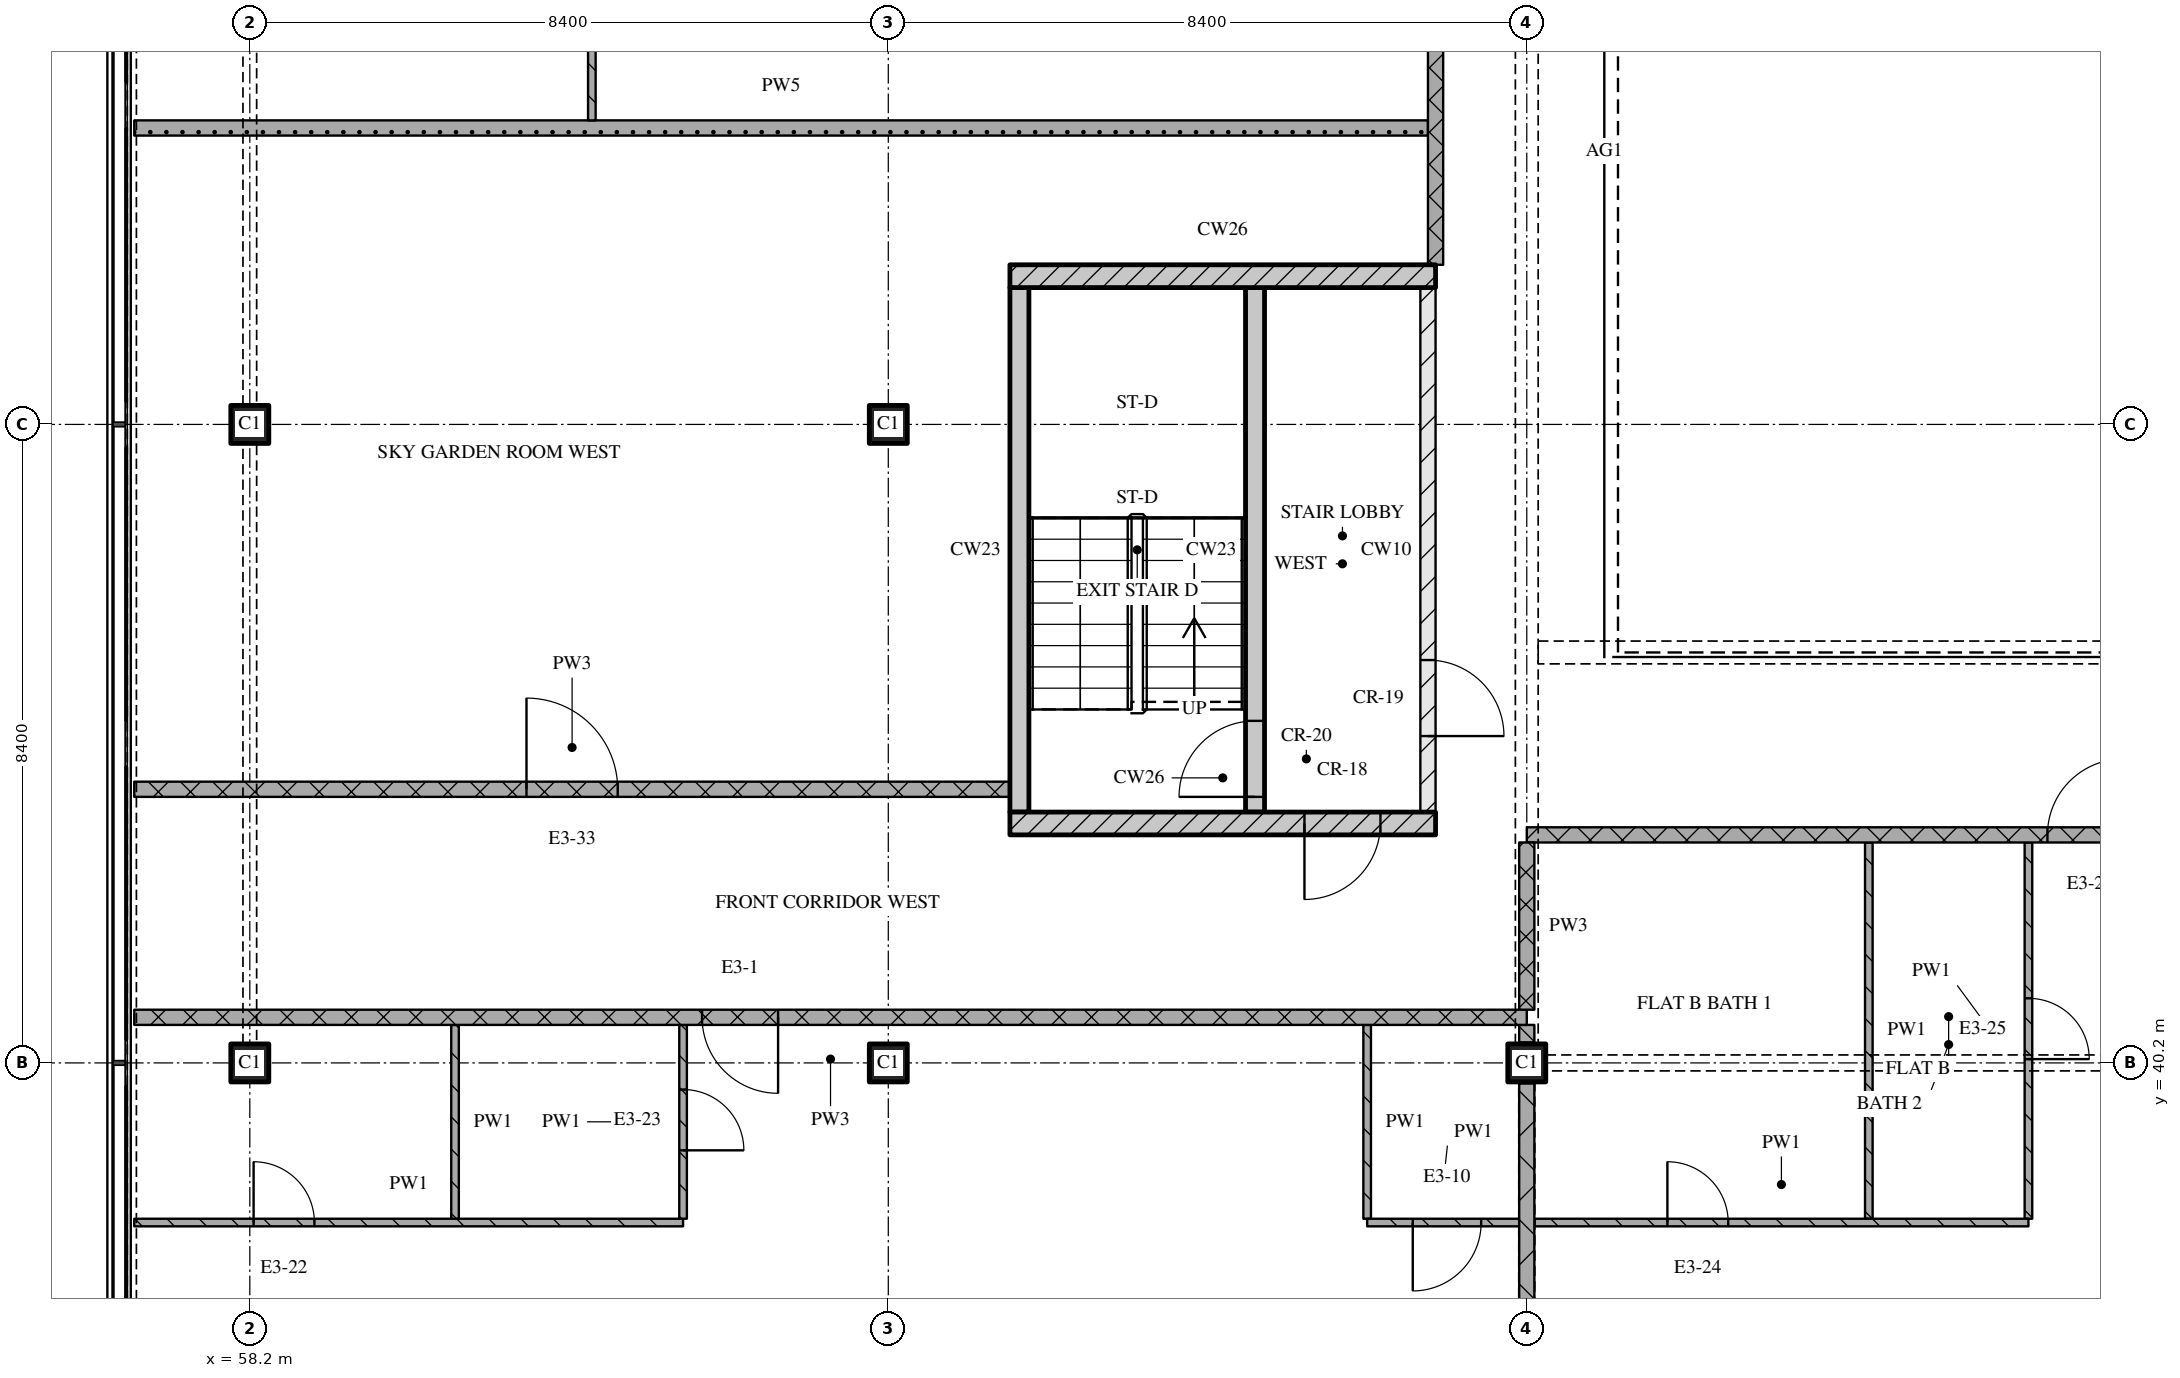
"""IFC4 building model, lengths in metres.
Left out: names, types, materials, properties, quantities, classifications, styles, units other than length and angle.
Written with IfcOpenShell. Run it as: python <this file> out.ifc"""

import sys

from ifc_helpers import new_model, si_unit, direction, frame, frame_2d, origin, origin_2d, place, context, subcontext, project, spatial, rectangle, extrude, element, fill, save


model = new_model("IFC4")
c1 = context("Model", 3, precision=1e-05, world=origin(), true_north=direction((0.0, 1.0)))
c2 = subcontext(c1, "Body", "Model", "MODEL_VIEW")
j1 = project(units=[si_unit("LENGTHUNIT", "METRE"), si_unit("PLANEANGLEUNIT", "RADIAN")], contexts=[c1])
p1 = place(None, origin())
s1 = spatial("IfcSite", under=j1, at=p1, CompositionType="ELEMENT")
p2 = place(p1, origin())
s2 = spatial("IfcBuilding", under=s1, at=p2, CompositionType="ELEMENT")
p3 = place(p2, frame((0.0, 0.0, 277.95)))
s3 = spatial("IfcBuildingStorey", under=s2, at=p3, CompositionType="ELEMENT", Elevation=277.95)
for number, where, z_axis, x_axis in (
    (1, (58.2, 40.2, 0.0), (0.0, 0.0, 1.0), (1.0, 0.0, 0.0)),
    (2, (58.2, 48.6, 0.0), (0.0, 0.0, 1.0), (1.0, 0.0, 0.0)),
    (3, (66.6, 40.2, 0.0), (0.0, 0.0, 1.0), (1.0, 0.0, 0.0)),
    (4, (66.6, 48.6, 0.0), (0.0, 0.0, 1.0), (1.0, 0.0, 0.0)),
    (5, (75.0, 40.2, 0.0), (0.0, 0.0, 1.0), (1.0, 0.0, 0.0)),
):
    element("IfcColumn", number, at=place(p3, frame(where, z_axis=z_axis, x_axis=x_axis)), inside=s3, PredefinedType="COLUMN", context=c2, shape_type="SweptSolid", body=[
        extrude(rectangle(XDim=0.5, YDim=0.5, at=origin_2d()), origin(), (0.0, 0.0, 1.0), 3.6),
    ])
p4 = place(p3, frame((68.2, 43.35, 0.0), z_axis=(0.0, 0.0, 1.0), x_axis=(1.0, 0.0, 0.0)))
e6 = element("IfcWall", 6, at=p4, inside=s3, PredefinedType="SOLIDWALL", context=c2, shape_type="SweptSolid", body=[
    extrude(rectangle(XDim=5.6, YDim=0.3, at=frame_2d((2.8, 0.0))), origin(), (0.0, 0.0, 1.0), 3.32),
])
p5 = place(p4, frame((3.875, 0.0, 0.0)))
e7 = element("IfcOpeningElement", 7, at=p5, cuts=e6, PredefinedType="OPENING", context=c2, shape_type="SweptSolid", body=[
    extrude(rectangle(XDim=1.0, YDim=2.1, at=frame_2d((0.5, 1.05))), frame((0.0, 0.16, 0.0), z_axis=(0.0, -1.0, 0.0), x_axis=(1.0, 0.0, 0.0)), (0.0, 0.0, 1.0), 0.32),
])
p6 = place(p3, frame((68.325, 43.5, 0.0), z_axis=(0.0, 0.0, 1.0), x_axis=(0.0, 1.0, 0.0)))
e8 = element("IfcWall", 8, at=p6, inside=s3, PredefinedType="SOLIDWALL", context=c2, shape_type="SweptSolid", body=[
    extrude(rectangle(XDim=6.9, YDim=0.25, at=frame_2d((3.45, 0.0))), origin(), (0.0, 0.0, 1.0), 3.32),
])
p7 = place(p3, frame((71.425, 43.5, 0.0), z_axis=(0.0, 0.0, 1.0), x_axis=(0.0, 1.0, 0.0)))
e9 = element("IfcWall", 9, at=p7, inside=s3, PredefinedType="SOLIDWALL", context=c2, shape_type="SweptSolid", body=[
    extrude(rectangle(XDim=6.9, YDim=0.25, at=frame_2d((3.45, 0.0))), origin(), (0.0, 0.0, 1.0), 3.32),
])
p8 = place(p7, frame((0.2, 0.0, 0.0)))
e10 = element("IfcOpeningElement", 10, at=p8, cuts=e9, PredefinedType="OPENING", context=c2, shape_type="SweptSolid", body=[
    extrude(rectangle(XDim=1.0, YDim=2.1, at=frame_2d((0.5, 1.05))), frame((0.0, 0.135, 0.0), z_axis=(0.0, -1.0, 0.0), x_axis=(1.0, 0.0, 0.0)), (0.0, 0.0, 1.0), 0.27),
])
p9 = place(p3, frame((73.7, 43.5, 0.0), z_axis=(0.0, 0.0, 1.0), x_axis=(0.0, 1.0, 0.0)))
e11 = element("IfcWall", 11, at=p9, inside=s3, PredefinedType="PARTITIONING", context=c2, shape_type="SweptSolid", body=[
    extrude(rectangle(XDim=6.9, YDim=0.2, at=frame_2d((3.45, 0.0))), origin(), (0.0, 0.0, 1.0), 3.32),
])
p10 = place(p9, frame((1.0, 0.0, 0.0)))
e12 = element("IfcOpeningElement", 12, at=p10, cuts=e11, PredefinedType="OPENING", context=c2, shape_type="SweptSolid", body=[
    extrude(rectangle(XDim=1.0, YDim=2.1, at=frame_2d((0.5, 1.05))), frame((0.0, 0.11, 0.0), z_axis=(0.0, -1.0, 0.0), x_axis=(1.0, 0.0, 0.0)), (0.0, 0.0, 1.0), 0.22),
])
p11 = place(p3, frame((68.2, 50.55, 0.0), z_axis=(0.0, 0.0, 1.0), x_axis=(1.0, 0.0, 0.0)))
e13 = element("IfcWall", 13, at=p11, inside=s3, PredefinedType="SOLIDWALL", context=c2, shape_type="SweptSolid", body=[
    extrude(rectangle(XDim=5.6, YDim=0.3, at=frame_2d((2.8, 0.0))), origin(), (0.0, 0.0, 1.0), 3.32),
])
p12 = place(p3, frame((56.68, 38.1, 0.0), z_axis=(0.0, 0.0, 1.0), x_axis=(1.0, 0.0, 0.0)))
e14 = element("IfcWall", 14, at=p12, inside=s3, PredefinedType="PARTITIONING", context=c2, shape_type="SweptSolid", body=[
    extrude(rectangle(XDim=7.22, YDim=0.1, at=frame_2d((3.61, 0.0))), origin(), (0.0, 0.0, 1.0), 3.32),
])
p13 = place(p12, frame((1.57, 0.0, 0.0)))
e15 = element("IfcOpeningElement", 15, at=p13, cuts=e14, PredefinedType="OPENING", context=c2, shape_type="SweptSolid", body=[
    extrude(rectangle(XDim=0.8, YDim=2.1, at=frame_2d((0.4, 1.05))), frame((0.0, 0.06, 0.0), z_axis=(0.0, -1.0, 0.0), x_axis=(1.0, 0.0, 0.0)), (0.0, 0.0, 1.0), 0.12),
])
p14 = place(p3, frame((75.0, 40.8, 0.0), z_axis=(0.0, 0.0, 1.0), x_axis=(-1.0, 0.0, 0.0)))
e16 = element("IfcWall", 16, at=p14, inside=s3, PredefinedType="PARTITIONING", context=c2, shape_type="SweptSolid", body=[
    extrude(rectangle(XDim=18.32, YDim=0.2, at=frame_2d((9.16, 0.0))), origin(), (0.0, 0.0, 1.0), 3.32),
])
p15 = place(p14, frame((9.85, 0.0, 0.0)))
e17 = element("IfcOpeningElement", 17, at=p15, cuts=e16, PredefinedType="OPENING", context=c2, shape_type="SweptSolid", body=[
    extrude(rectangle(XDim=1.0, YDim=2.1, at=frame_2d((0.5, 1.05))), frame((0.0, 0.11, 0.0), z_axis=(0.0, -1.0, 0.0), x_axis=(1.0, 0.0, 0.0)), (0.0, 0.0, 1.0), 0.22),
])
p16 = place(p3, frame((100.2, 43.2, 0.0), z_axis=(0.0, 0.0, 1.0), x_axis=(-1.0, 0.0, 0.0)))
e18 = element("IfcWall", 18, at=p16, inside=s3, PredefinedType="PARTITIONING", context=c2, shape_type="SweptSolid", body=[
    extrude(rectangle(XDim=25.2, YDim=0.2, at=frame_2d((12.6, 0.0))), origin(), (0.0, 0.0, 1.0), 3.32),
])
p17 = place(p16, frame((17.35, 0.0, 0.0)))
e19 = element("IfcOpeningElement", 19, at=p17, cuts=e18, PredefinedType="OPENING", context=c2, shape_type="SweptSolid", body=[
    extrude(rectangle(XDim=1.0, YDim=2.1, at=frame_2d((0.5, 1.05))), frame((0.0, 0.11, 0.0), z_axis=(0.0, -1.0, 0.0), x_axis=(1.0, 0.0, 0.0)), (0.0, 0.0, 1.0), 0.22),
])
p18 = place(p3, frame((56.68, 43.8, 0.0), z_axis=(0.0, 0.0, 1.0), x_axis=(1.0, 0.0, 0.0)))
e20 = element("IfcWall", 20, at=p18, inside=s3, PredefinedType="PARTITIONING", context=c2, shape_type="SweptSolid", body=[
    extrude(rectangle(XDim=11.52, YDim=0.2, at=frame_2d((5.76, 0.0))), origin(), (0.0, 0.0, 1.0), 3.32),
])
p19 = place(p18, frame((5.16, 0.0, 0.0)))
e21 = element("IfcOpeningElement", 21, at=p19, cuts=e20, PredefinedType="OPENING", context=c2, shape_type="SweptSolid", body=[
    extrude(rectangle(XDim=1.2, YDim=2.1, at=frame_2d((0.6, 1.05))), frame((0.0, 0.11, 0.0), z_axis=(0.0, -1.0, 0.0), x_axis=(1.0, 0.0, 0.0)), (0.0, 0.0, 1.0), 0.22),
])
p20 = place(p3, frame((56.68, 52.5, 0.0), z_axis=(0.0, 0.0, 1.0), x_axis=(1.0, 0.0, 0.0)))
e22 = element("IfcWall", 22, at=p20, inside=s3, PredefinedType="PARTITIONING", context=c2, shape_type="SweptSolid", body=[
    extrude(rectangle(XDim=17.02, YDim=0.2, at=frame_2d((8.51, 0.0))), origin(), (0.0, 0.0, 1.0), 3.32),
])
p21 = place(p3, frame((60.9, 40.7, 0.0), z_axis=(0.0, 0.0, 1.0), x_axis=(0.0, -1.0, 0.0)))
e23 = element("IfcWall", 23, at=p21, inside=s3, PredefinedType="PARTITIONING", context=c2, shape_type="SweptSolid", body=[
    extrude(rectangle(XDim=2.55, YDim=0.1, at=frame_2d((1.275, 0.0))), origin(), (0.0, 0.0, 1.0), 3.32),
])
p22 = place(p3, frame((62.7, 52.6, 0.0), z_axis=(0.0, 0.0, 1.0), x_axis=(0.0, 1.0, 0.0)))
e24 = element("IfcWall", 24, at=p22, inside=s3, PredefinedType="PARTITIONING", context=c2, shape_type="SweptSolid", body=[
    extrude(rectangle(XDim=3.0, YDim=0.1, at=frame_2d((1.5, 0.0))), origin(), (0.0, 0.0, 1.0), 3.32),
])
p23 = place(p22, frame((1.025, 0.0, 0.0)))
e25 = element("IfcOpeningElement", 25, at=p23, cuts=e24, PredefinedType="OPENING", context=c2, shape_type="SweptSolid", body=[
    extrude(rectangle(XDim=0.9, YDim=2.1, at=frame_2d((0.45, 1.05))), frame((0.0, 0.06, 0.0), z_axis=(0.0, -1.0, 0.0), x_axis=(1.0, 0.0, 0.0)), (0.0, 0.0, 1.0), 0.12),
])
p24 = place(p3, frame((63.9, 38.15, 0.0), z_axis=(0.0, 0.0, 1.0), x_axis=(0.0, 1.0, 0.0)))
e26 = element("IfcWall", 26, at=p24, inside=s3, PredefinedType="PARTITIONING", context=c2, shape_type="SweptSolid", body=[
    extrude(rectangle(XDim=2.55, YDim=0.1, at=frame_2d((1.275, 0.0))), origin(), (0.0, 0.0, 1.0), 3.32),
])
p25 = place(p24, frame((0.9, 0.0, 0.0)))
e27 = element("IfcOpeningElement", 27, at=p25, cuts=e26, PredefinedType="OPENING", context=c2, shape_type="SweptSolid", body=[
    extrude(rectangle(XDim=0.8, YDim=2.1, at=frame_2d((0.4, 1.05))), frame((0.0, 0.06, 0.0), z_axis=(0.0, -1.0, 0.0), x_axis=(1.0, 0.0, 0.0)), (0.0, 0.0, 1.0), 0.12),
])
p26 = place(p3, frame((72.9, 40.7, 0.0), z_axis=(0.0, 0.0, 1.0), x_axis=(0.0, -1.0, 0.0)))
e28 = element("IfcWall", 28, at=p26, inside=s3, PredefinedType="PARTITIONING", context=c2, shape_type="SweptSolid", body=[
    extrude(rectangle(XDim=2.55, YDim=0.1, at=frame_2d((1.275, 0.0))), origin(), (0.0, 0.0, 1.0), 3.32),
])
p27 = place(p3, frame((73.8, 50.7, 0.0), z_axis=(0.0, 0.0, 1.0), x_axis=(0.0, 1.0, 0.0)))
e29 = element("IfcWall", 29, at=p27, inside=s3, PredefinedType="PARTITIONING", context=c2, shape_type="SweptSolid", body=[
    extrude(rectangle(XDim=8.0, YDim=0.2, at=frame_2d((4.0, 0.0))), origin(), (0.0, 0.0, 1.0), 3.32),
])
p28 = place(p27, frame((4.45, 0.0, 0.0)))
e30 = element("IfcOpeningElement", 30, at=p28, cuts=e29, PredefinedType="OPENING", context=c2, shape_type="SweptSolid", body=[
    extrude(rectangle(XDim=1.0, YDim=2.1, at=frame_2d((0.5, 1.05))), frame((0.0, 0.11, 0.0), z_axis=(0.0, -1.0, 0.0), x_axis=(1.0, 0.0, 0.0)), (0.0, 0.0, 1.0), 0.22),
])
p29 = place(p3, frame((75.0, 43.1, 0.0), z_axis=(0.0, 0.0, 1.0), x_axis=(0.0, -1.0, 0.0)))
e31 = element("IfcWall", 31, at=p29, inside=s3, PredefinedType="PARTITIONING", context=c2, shape_type="SweptSolid", body=[
    extrude(rectangle(XDim=2.2, YDim=0.2, at=frame_2d((1.1, 0.0))), origin(), (0.0, 0.0, 1.0), 2.53),
])
p30 = place(p3, frame((75.0, 39.93, 0.0), z_axis=(0.0, 0.0, 1.0), x_axis=(0.0, -1.0, 0.0)))
e32 = element("IfcWall", 32, at=p30, inside=s3, PredefinedType="PARTITIONING", context=c2, shape_type="SweptSolid", body=[
    extrude(rectangle(XDim=7.86, YDim=0.2, at=frame_2d((3.93, 0.0))), origin(), (0.0, 0.0, 1.0), 2.77),
])
p31 = place(p3, frame((75.0, 40.7, 0.0), z_axis=(0.0, 0.0, 1.0), x_axis=(0.0, -1.0, 0.0)))
e33 = element("IfcWall", 33, at=p31, inside=s3, PredefinedType="PARTITIONING", context=c2, shape_type="SweptSolid", body=[
    extrude(rectangle(XDim=0.23, YDim=0.2, at=frame_2d((0.115, 0.0))), origin(), (0.0, 0.0, 1.0), 3.32),
])
p32 = place(p3, frame((79.5, 43.1, 0.0), z_axis=(0.0, 0.0, 1.0), x_axis=(0.0, -1.0, 0.0)))
e34 = element("IfcWall", 34, at=p32, inside=s3, PredefinedType="PARTITIONING", context=c2, shape_type="SweptSolid", body=[
    extrude(rectangle(XDim=4.95, YDim=0.1, at=frame_2d((2.475, 0.0))), origin(), (0.0, 0.0, 1.0), 3.32),
])
p33 = place(p3, frame((81.6, 38.15, 0.0), z_axis=(0.0, 0.0, 1.0), x_axis=(0.0, 1.0, 0.0)))
e35 = element("IfcWall", 35, at=p33, inside=s3, PredefinedType="PARTITIONING", context=c2, shape_type="SweptSolid", body=[
    extrude(rectangle(XDim=4.95, YDim=0.1, at=frame_2d((2.475, 0.0))), origin(), (0.0, 0.0, 1.0), 3.32),
])
p34 = place(p33, frame((2.1, 0.0, 0.0)))
e36 = element("IfcOpeningElement", 36, at=p34, cuts=e35, PredefinedType="OPENING", context=c2, shape_type="SweptSolid", body=[
    extrude(rectangle(XDim=0.8, YDim=2.1, at=frame_2d((0.4, 1.05))), frame((0.0, 0.06, 0.0), z_axis=(0.0, -1.0, 0.0), x_axis=(1.0, 0.0, 0.0)), (0.0, 0.0, 1.0), 0.12),
])
p35 = place(p3, frame((72.9, 38.1, 0.0), z_axis=(0.0, 0.0, 1.0), x_axis=(1.0, 0.0, 0.0)))
e37 = element("IfcWall", 37, at=p35, inside=s3, PredefinedType="PARTITIONING", context=c2, shape_type="SweptSolid", body=[
    extrude(rectangle(XDim=2.0, YDim=0.1, at=frame_2d((1.0, 0.0))), origin(), (0.0, 0.0, 1.0), 3.32),
])
p36 = place(p35, frame((0.6, 0.0, 0.0)))
e38 = element("IfcOpeningElement", 38, at=p36, cuts=e37, PredefinedType="OPENING", context=c2, shape_type="SweptSolid", body=[
    extrude(rectangle(XDim=0.9, YDim=2.1, at=frame_2d((0.45, 1.05))), frame((0.0, 0.06, 0.0), z_axis=(0.0, -1.0, 0.0), x_axis=(1.0, 0.0, 0.0)), (0.0, 0.0, 1.0), 0.12),
])
p37 = place(p3, frame((75.1, 38.1, 0.0), z_axis=(0.0, 0.0, 1.0), x_axis=(1.0, 0.0, 0.0)))
e39 = element("IfcWall", 39, at=p37, inside=s3, PredefinedType="PARTITIONING", context=c2, shape_type="SweptSolid", body=[
    extrude(rectangle(XDim=6.5, YDim=0.1, at=frame_2d((3.25, 0.0))), origin(), (0.0, 0.0, 1.0), 3.32),
])
p38 = place(p37, frame((1.75, 0.0, 0.0)))
e40 = element("IfcOpeningElement", 40, at=p38, cuts=e39, PredefinedType="OPENING", context=c2, shape_type="SweptSolid", body=[
    extrude(rectangle(XDim=0.8, YDim=2.1, at=frame_2d((0.4, 1.05))), frame((0.0, 0.06, 0.0), z_axis=(0.0, -1.0, 0.0), x_axis=(1.0, 0.0, 0.0)), (0.0, 0.0, 1.0), 0.12),
])
p39 = place(p5, origin())
e41 = element("IfcDoor", 41, at=p39, inside=s3, OperationType="SINGLE_SWING_RIGHT", PredefinedType="DOOR", context=c2, shape_type="SweptSolid", body=[
    extrude(rectangle(XDim=1.0, YDim=2.1, at=frame_2d((0.5, 1.05))), frame((0.0, 0.025, 0.0), z_axis=(0.0, -1.0, 0.0), x_axis=(1.0, 0.0, 0.0)), (0.0, 0.0, 1.0), 0.05),
])
fill(e7, e41)
p40 = place(p8, origin())
e42 = element("IfcDoor", 42, at=p40, inside=s3, OperationType="SINGLE_SWING_LEFT", PredefinedType="DOOR", context=c2, shape_type="SweptSolid", body=[
    extrude(rectangle(XDim=1.0, YDim=2.1, at=frame_2d((0.5, 1.05))), frame((0.0, 0.025, 0.0), z_axis=(0.0, -1.0, 0.0), x_axis=(1.0, 0.0, 0.0)), (0.0, 0.0, 1.0), 0.05),
])
fill(e10, e42)
p41 = place(p10, origin())
e43 = element("IfcDoor", 43, at=p41, inside=s3, OperationType="SINGLE_SWING_RIGHT", PredefinedType="DOOR", context=c2, shape_type="SweptSolid", body=[
    extrude(rectangle(XDim=1.0, YDim=2.1, at=frame_2d((0.5, 1.05))), frame((0.0, 0.025, 0.0), z_axis=(0.0, -1.0, 0.0), x_axis=(1.0, 0.0, 0.0)), (0.0, 0.0, 1.0), 0.05),
])
fill(e12, e43)
p42 = place(p13, origin())
e44 = element("IfcDoor", 44, at=p42, inside=s3, OperationType="SINGLE_SWING_LEFT", PredefinedType="DOOR", context=c2, shape_type="SweptSolid", body=[
    extrude(rectangle(XDim=0.8, YDim=2.1, at=frame_2d((0.4, 1.05))), frame((0.0, 0.025, 0.0), z_axis=(0.0, -1.0, 0.0), x_axis=(1.0, 0.0, 0.0)), (0.0, 0.0, 1.0), 0.05),
])
fill(e15, e44)
p43 = place(p15, origin())
e45 = element("IfcDoor", 45, at=p43, inside=s3, OperationType="SINGLE_SWING_LEFT", PredefinedType="DOOR", context=c2, shape_type="SweptSolid", body=[
    extrude(rectangle(XDim=1.0, YDim=2.1, at=frame_2d((0.5, 1.05))), frame((0.0, 0.025, 0.0), z_axis=(0.0, -1.0, 0.0), x_axis=(1.0, 0.0, 0.0)), (0.0, 0.0, 1.0), 0.05),
])
fill(e17, e45)
p44 = place(p17, origin())
e46 = element("IfcDoor", 46, at=p44, inside=s3, OperationType="SINGLE_SWING_RIGHT", PredefinedType="DOOR", context=c2, shape_type="SweptSolid", body=[
    extrude(rectangle(XDim=1.0, YDim=2.1, at=frame_2d((0.5, 1.05))), frame((0.0, 0.025, 0.0), z_axis=(0.0, -1.0, 0.0), x_axis=(1.0, 0.0, 0.0)), (0.0, 0.0, 1.0), 0.05),
])
fill(e19, e46)
p45 = place(p19, origin())
e47 = element("IfcDoor", 47, at=p45, inside=s3, OperationType="SINGLE_SWING_LEFT", PredefinedType="DOOR", context=c2, shape_type="SweptSolid", body=[
    extrude(rectangle(XDim=1.2, YDim=2.1, at=frame_2d((0.6, 1.05))), frame((0.0, 0.025, 0.0), z_axis=(0.0, -1.0, 0.0), x_axis=(1.0, 0.0, 0.0)), (0.0, 0.0, 1.0), 0.05),
])
fill(e21, e47)
p46 = place(p25, origin())
e48 = element("IfcDoor", 48, at=p46, inside=s3, OperationType="SINGLE_SWING_RIGHT", PredefinedType="DOOR", context=c2, shape_type="SweptSolid", body=[
    extrude(rectangle(XDim=0.8, YDim=2.1, at=frame_2d((0.4, 1.05))), frame((0.0, 0.025, 0.0), z_axis=(0.0, -1.0, 0.0), x_axis=(1.0, 0.0, 0.0)), (0.0, 0.0, 1.0), 0.05),
])
fill(e27, e48)
p47 = place(p34, origin())
e49 = element("IfcDoor", 49, at=p47, inside=s3, OperationType="SINGLE_SWING_RIGHT", PredefinedType="DOOR", context=c2, shape_type="SweptSolid", body=[
    extrude(rectangle(XDim=0.8, YDim=2.1, at=frame_2d((0.4, 1.05))), frame((0.0, 0.025, 0.0), z_axis=(0.0, -1.0, 0.0), x_axis=(1.0, 0.0, 0.0)), (0.0, 0.0, 1.0), 0.05),
])
fill(e36, e49)
p48 = place(p36, origin())
e50 = element("IfcDoor", 50, at=p48, inside=s3, OperationType="SINGLE_SWING_RIGHT", PredefinedType="DOOR", context=c2, shape_type="SweptSolid", body=[
    extrude(rectangle(XDim=0.9, YDim=2.1, at=frame_2d((0.45, 1.05))), frame((0.0, 0.025, 0.0), z_axis=(0.0, -1.0, 0.0), x_axis=(1.0, 0.0, 0.0)), (0.0, 0.0, 1.0), 0.05),
])
fill(e38, e50)
p49 = place(p38, origin())
e51 = element("IfcDoor", 51, at=p49, inside=s3, OperationType="SINGLE_SWING_LEFT", PredefinedType="DOOR", context=c2, shape_type="SweptSolid", body=[
    extrude(rectangle(XDim=0.8, YDim=2.1, at=frame_2d((0.4, 1.05))), frame((0.0, 0.025, 0.0), z_axis=(0.0, -1.0, 0.0), x_axis=(1.0, 0.0, 0.0)), (0.0, 0.0, 1.0), 0.05),
])
fill(e40, e51)
save(model, sys.argv[1])
